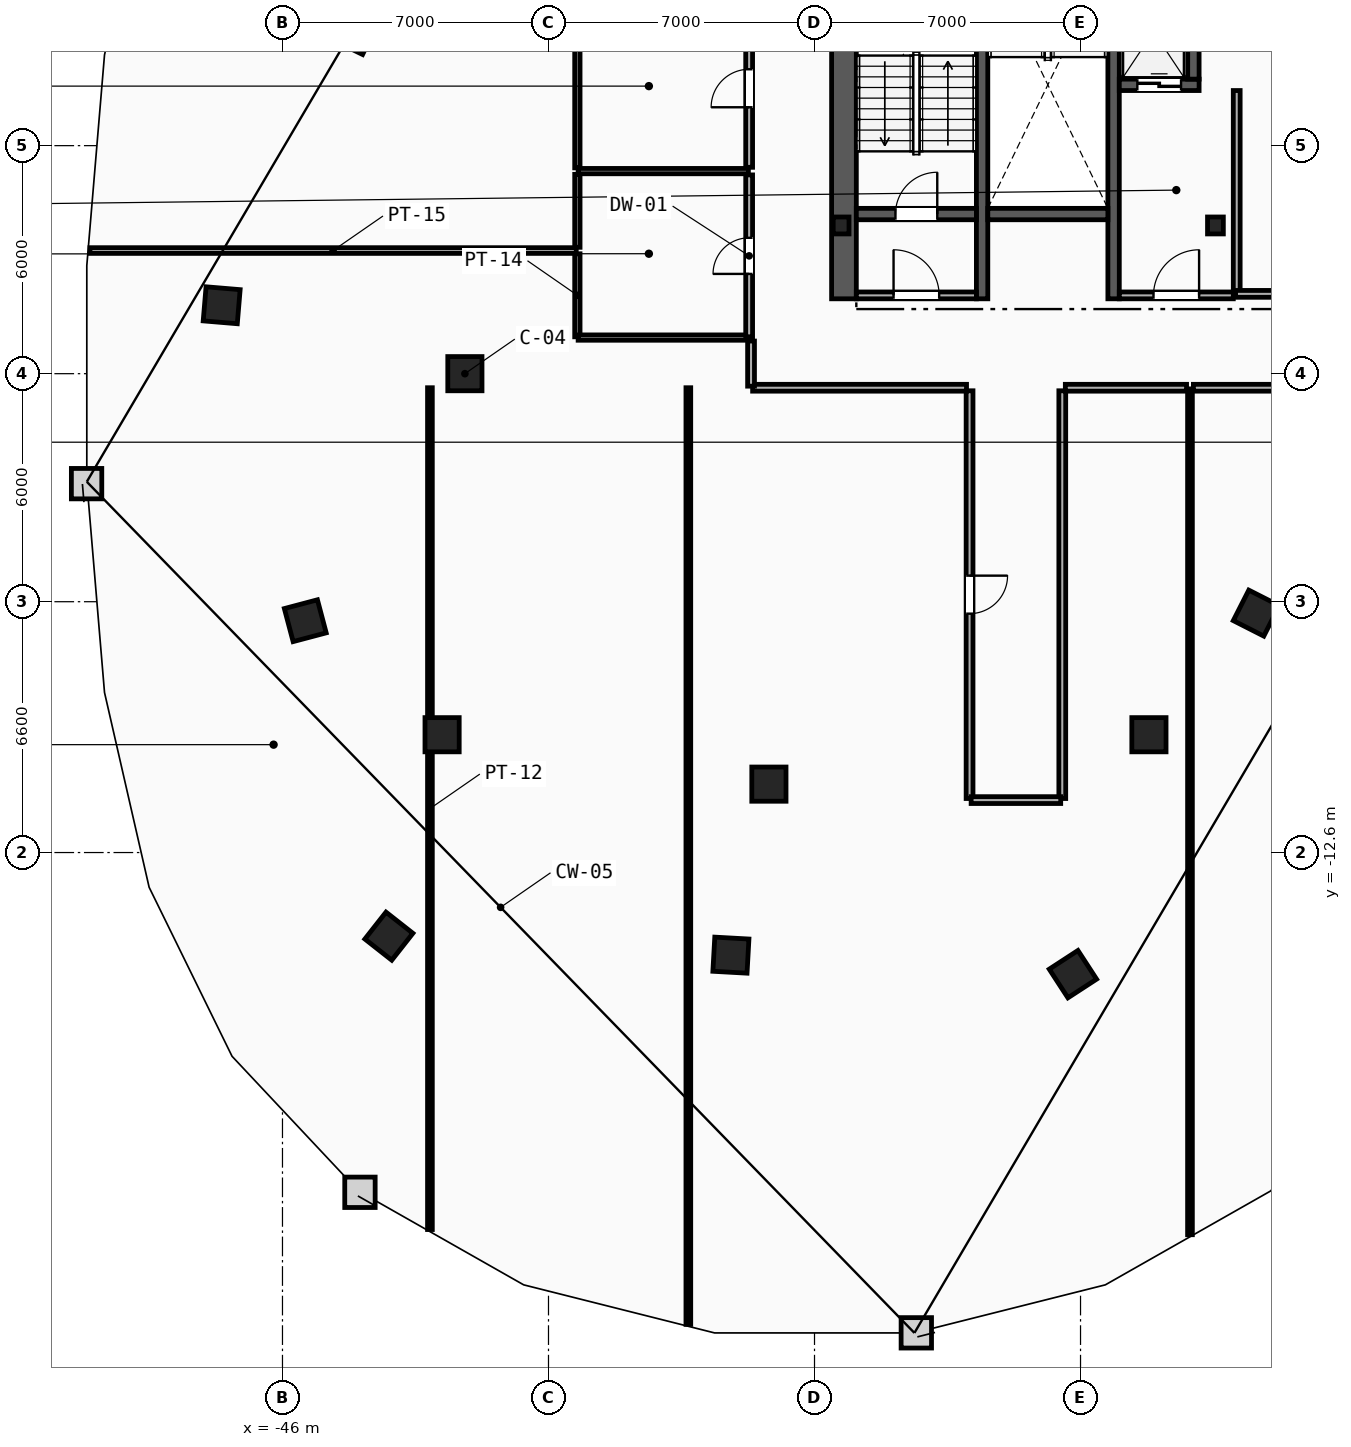
"""IFC4 building model, lengths in metres.
Left out: names, types, materials, properties, quantities, classifications, styles, units other than length and angle.
Written with IfcOpenShell. Run it as: python <this file> out.ifc"""

import sys

from ifc_helpers import new_model, si_unit, direction, frame, frame_2d, origin, origin_2d, place, context, subcontext, project, spatial, rectangle, i_section, extrude, element, fill, save


model = new_model("IFC4")
c1 = context("Model", 3, precision=1e-05, world=origin(), true_north=direction((0.0, 1.0)))
c2 = subcontext(c1, "Body", "Model", "MODEL_VIEW")
j1 = project(units=[si_unit("LENGTHUNIT", "METRE"), si_unit("PLANEANGLEUNIT", "RADIAN")], contexts=[c1])
p1 = place(None, origin())
s1 = spatial("IfcSite", under=j1, at=p1, CompositionType="ELEMENT")
p2 = place(p1, origin())
s2 = spatial("IfcBuilding", under=s1, at=p2, CompositionType="ELEMENT")
p3 = place(p2, frame((0.0, 0.0, 195.4)))
s3 = spatial("IfcBuildingStorey", under=s2, at=p3, CompositionType="ELEMENT", Elevation=195.4)
for number, where, z_axis, x_axis in (
    (1, (-31.3, 3.9, 0.0), (0.0, 0.0, 1.0), (1.0, 0.0, 0.0)),
    (2, (-21.45, 3.9, 0.0), (0.0, 0.0, 1.0), (1.0, 0.0, 0.0)),
):
    element("IfcColumn", number, at=place(p3, frame(where, z_axis=z_axis, x_axis=x_axis)), inside=s3, PredefinedType="COLUMN", context=c2, shape_type="SweptSolid", body=[
        extrude(i_section(OverallWidth=0.416, OverallDepth=0.446, WebThickness=0.039, FlangeThickness=0.063, FilletRadius=0.018, at=origin_2d()), origin(), (0.0, 0.0, 1.0), 3.6),
    ])
for number, where, z_axis, x_axis in (
    (3, (-41.2, 0.0, 0.0), (0.0, 0.0, 1.0), (1.0, 0.0, 0.0)),
    (4, (-41.8, -9.5, 0.0), (0.0, 0.0, 1.0), (1.0, 0.0, 0.0)),
    (5, (-33.2, -10.8, 0.0), (0.0, 0.0, 1.0), (1.0, 0.0, 0.0)),
    (6, (-23.2, -9.5, 0.0), (0.0, 0.0, 1.0), (1.0, 0.0, 0.0)),
    (7, (-44.1, 9.0, 0.0), (0.0, 0.0, 1.0), (-0.437, -0.899, 0.0)),
    (8, (-47.6, 1.8, 0.0), (0.0, 0.0, 1.0), (-0.084, -0.997, 0.0)),
    (9, (-45.4, -6.5, 0.0), (0.0, 0.0, 1.0), (0.256, -0.967, 0.0)),
    (10, (-43.2, -14.8, 0.0), (0.0, 0.0, 1.0), (0.786, -0.618, 0.0)),
    (11, (-34.2, -15.3, 0.0), (0.0, 0.0, 1.0), (0.998, -0.055, 0.0)),
    (12, (-25.2, -15.8, 0.0), (0.0, 0.0, 1.0), (0.838, 0.546, 0.0)),
    (13, (-20.375, -6.3, 0.0), (0.0, 0.0, 1.0), (0.453, 0.892, 0.0)),
):
    element("IfcColumn", number, at=place(p3, frame(where, z_axis=z_axis, x_axis=x_axis)), inside=s3, PredefinedType="COLUMN", context=c2, shape_type="SweptSolid", body=[
        extrude(rectangle(XDim=0.9, YDim=0.9, at=origin_2d()), origin(), (0.0, 0.0, 1.0), 3.6),
    ])
p4 = place(p3, frame((-31.225, 1.97, 0.0), z_axis=(0.0, 0.0, 1.0), x_axis=(0.0, 1.0, 0.0)))
e14 = element("IfcWall", 14, at=p4, inside=s3, PredefinedType="SHEAR", context=c2, shape_type="SweptSolid", body=[
    extrude(rectangle(XDim=13.33, YDim=0.65, at=frame_2d((6.665, 0.0))), origin(), (0.0, 0.0, 1.0), 3.34),
])
for number, where, z_axis, x_axis in (
    (15, (-27.59, 1.97, 0.0), (0.0, 0.0, 1.0), (0.0, 1.0, 0.0)),
    (16, (-24.13, 1.97, 0.0), (0.0, 0.0, 1.0), (0.0, 1.0, 0.0)),
):
    element("IfcWall", number, at=place(p3, frame(where, z_axis=z_axis, x_axis=x_axis)), inside=s3, PredefinedType="SHEAR", context=c2, shape_type="SweptSolid", body=[
        extrude(rectangle(XDim=10.68, YDim=0.3, at=frame_2d((5.34, 0.0))), origin(), (0.0, 0.0, 1.0), 3.34),
    ])
p5 = place(p3, frame((-30.9, 4.2, 0.0), z_axis=(0.0, 0.0, 1.0), x_axis=(1.0, 0.0, 0.0)))
e17 = element("IfcWall", 17, at=p5, inside=s3, PredefinedType="SHEAR", context=c2, shape_type="SweptSolid", body=[
    extrude(rectangle(XDim=3.16, YDim=0.3, at=frame_2d((1.58, 0.0))), origin(), (0.0, 0.0, 1.0), 3.34),
])
p6 = place(p5, frame((1.03, 0.0, 0.0)))
e18 = element("IfcOpeningElement", 18, at=p6, cuts=e17, PredefinedType="OPENING", context=c2, shape_type="SweptSolid", body=[
    extrude(rectangle(XDim=1.1, YDim=2.15, at=frame_2d((0.55, 1.075))), frame((0.0, 0.16, 0.0), z_axis=(0.0, -1.0, 0.0), x_axis=(1.0, 0.0, 0.0)), (0.0, 0.0, 1.0), 0.32),
])
p7 = place(p3, frame((-27.44, 4.2, 0.0), z_axis=(0.0, 0.0, 1.0), x_axis=(1.0, 0.0, 0.0)))
e19 = element("IfcWall", 19, at=p7, inside=s3, PredefinedType="SHEAR", context=c2, shape_type="SweptSolid", body=[
    extrude(rectangle(XDim=3.16, YDim=0.3, at=frame_2d((1.58, 0.0))), origin(), (0.0, 0.0, 1.0), 3.34),
])
p8 = place(p3, frame((-20.89, 2.15, 0.0), z_axis=(0.0, 0.0, 1.0), x_axis=(0.0, 1.0, 0.0)))
e20 = element("IfcWall", 20, at=p8, inside=s3, PredefinedType="PARTITIONING", context=c2, shape_type="SweptSolid", body=[
    extrude(rectangle(XDim=5.3, YDim=0.18, at=frame_2d((2.65, 0.0))), origin(), (0.0, 0.0, 1.0), 3.34),
])
p9 = place(p3, frame((-23.98, 2.06, 0.0), z_axis=(0.0, 0.0, 1.0), x_axis=(1.0, 0.0, 0.0)))
e21 = element("IfcWall", 21, at=p9, inside=s3, PredefinedType="PARTITIONING", context=c2, shape_type="SweptSolid", body=[
    extrude(rectangle(XDim=3.0, YDim=0.18, at=frame_2d((1.5, 0.0))), origin(), (0.0, 0.0, 1.0), 3.34),
])
p10 = place(p9, frame((0.9, 0.0, 0.0)))
e22 = element("IfcOpeningElement", 22, at=p10, cuts=e21, PredefinedType="OPENING", context=c2, shape_type="SweptSolid", body=[
    extrude(rectangle(XDim=1.2, YDim=2.15, at=frame_2d((0.6, 1.075))), frame((0.0, 0.1, 0.0), z_axis=(0.0, -1.0, 0.0), x_axis=(1.0, 0.0, 0.0)), (0.0, 0.0, 1.0), 0.2),
])
p11 = place(p3, frame((-30.9, 2.06, 0.0), z_axis=(0.0, 0.0, 1.0), x_axis=(1.0, 0.0, 0.0)))
e23 = element("IfcWall", 23, at=p11, inside=s3, PredefinedType="PARTITIONING", context=c2, shape_type="SweptSolid", body=[
    extrude(rectangle(XDim=3.16, YDim=0.18, at=frame_2d((1.58, 0.0))), origin(), (0.0, 0.0, 1.0), 3.34),
])
p12 = place(p11, frame((0.98, 0.0, 0.0)))
e24 = element("IfcOpeningElement", 24, at=p12, cuts=e23, PredefinedType="OPENING", context=c2, shape_type="SweptSolid", body=[
    extrude(rectangle(XDim=1.2, YDim=2.15, at=frame_2d((0.6, 1.075))), frame((0.0, 0.1, 0.0), z_axis=(0.0, -1.0, 0.0), x_axis=(1.0, 0.0, 0.0)), (0.0, 0.0, 1.0), 0.2),
])
p13 = place(p3, frame((-23.98, 7.6, 0.0), z_axis=(0.0, 0.0, 1.0), x_axis=(1.0, 0.0, 0.0)))
e25 = element("IfcWall", 25, at=p13, inside=s3, PredefinedType="SHEAR", context=c2, shape_type="SweptSolid", body=[
    extrude(rectangle(XDim=2.1, YDim=0.3, at=frame_2d((1.05, 0.0))), origin(), (0.0, 0.0, 1.0), 3.34),
])
p14 = place(p13, frame((0.475, 0.0, 0.0)))
e26 = element("IfcOpeningElement", 26, at=p14, cuts=e25, PredefinedType="OPENING", context=c2, shape_type="SweptSolid", body=[
    extrude(rectangle(XDim=1.15, YDim=2.2, at=frame_2d((0.575, 1.1))), frame((0.0, 0.16, 0.0), z_axis=(0.0, -1.0, 0.0), x_axis=(1.0, 0.0, 0.0)), (0.0, 0.0, 1.0), 0.32),
])
p15 = place(p3, frame((-22.03, 7.75, 0.0), z_axis=(0.0, 0.0, 1.0), x_axis=(0.0, 1.0, 0.0)))
e27 = element("IfcWall", 27, at=p15, inside=s3, PredefinedType="SHEAR", context=c2, shape_type="SweptSolid", body=[
    extrude(rectangle(XDim=2.5, YDim=0.3, at=frame_2d((1.25, 0.0))), origin(), (0.0, 0.0, 1.0), 3.34),
])
p16 = place(p3, frame((-38.24, 0.97, 0.0), z_axis=(0.0, 0.0, 1.0), x_axis=(0.0, 1.0, 0.0)))
e28 = element("IfcWall", 28, at=p16, inside=s3, PredefinedType="PARTITIONING", context=c2, shape_type="SweptSolid", body=[
    extrude(rectangle(XDim=2.185, YDim=0.14, at=frame_2d((1.093, 0.0))), origin(), (0.0, 0.0, 1.0), 3.34),
])
p17 = place(p3, frame((-38.24, 3.325, 0.0), z_axis=(0.0, 0.0, 1.0), x_axis=(0.0, 1.0, 0.0)))
e29 = element("IfcWall", 29, at=p17, inside=s3, PredefinedType="PARTITIONING", context=c2, shape_type="SweptSolid", body=[
    extrude(rectangle(XDim=1.92, YDim=0.14, at=frame_2d((0.96, 0.0))), origin(), (0.0, 0.0, 1.0), 3.34),
])
p18 = place(p3, frame((-38.24, 5.415, 0.0), z_axis=(0.0, 0.0, 1.0), x_axis=(0.0, 1.0, 0.0)))
e30 = element("IfcWall", 30, at=p18, inside=s3, PredefinedType="PARTITIONING", context=c2, shape_type="SweptSolid", body=[
    extrude(rectangle(XDim=4.175, YDim=0.14, at=frame_2d((2.087, 0.0))), origin(), (0.0, 0.0, 1.0), 3.34),
])
for number, where, z_axis, x_axis in (
    (31, (-38.22, 0.95, 0.0), (0.0, 0.0, 1.0), (1.0, 0.0, 0.0)),
    (32, (-38.22, 5.33, 0.0), (0.0, 0.0, 1.0), (1.0, 0.0, 0.0)),
):
    element("IfcWall", number, at=place(p3, frame(where, z_axis=z_axis, x_axis=x_axis)), inside=s3, PredefinedType="PARTITIONING", context=c2, shape_type="SweptSolid", body=[
        extrude(rectangle(XDim=4.48, YDim=0.14, at=frame_2d((2.24, 0.0))), origin(), (0.0, 0.0, 1.0), 3.34),
    ])
p19 = place(p3, frame((-33.72, 0.97, 0.0), z_axis=(0.0, 0.0, 1.0), x_axis=(0.0, 1.0, 0.0)))
e33 = element("IfcWall", 33, at=p19, inside=s3, PredefinedType="PARTITIONING", context=c2, shape_type="SweptSolid", body=[
    extrude(rectangle(XDim=4.26, YDim=0.18, at=frame_2d((2.13, 0.0))), origin(), (0.0, 0.0, 1.0), 3.34),
])
p20 = place(p19, frame((1.655, 0.0, 0.0)))
e34 = element("IfcOpeningElement", 34, at=p20, cuts=e33, PredefinedType="OPENING", context=c2, shape_type="SweptSolid", body=[
    extrude(rectangle(XDim=0.95, YDim=2.1, at=frame_2d((0.475, 1.05))), frame((0.0, 0.1, 0.0), z_axis=(0.0, -1.0, 0.0), x_axis=(1.0, 0.0, 0.0)), (0.0, 0.0, 1.0), 0.2),
])
p21 = place(p3, frame((-33.72, 5.43, 0.0), z_axis=(0.0, 0.0, 1.0), x_axis=(0.0, 1.0, 0.0)))
e35 = element("IfcWall", 35, at=p21, inside=s3, PredefinedType="PARTITIONING", context=c2, shape_type="SweptSolid", body=[
    extrude(rectangle(XDim=4.16, YDim=0.18, at=frame_2d((2.08, 0.0))), origin(), (0.0, 0.0, 1.0), 3.34),
])
p22 = place(p21, frame((1.58, 0.0, 0.0)))
e36 = element("IfcOpeningElement", 36, at=p22, cuts=e35, PredefinedType="OPENING", context=c2, shape_type="SweptSolid", body=[
    extrude(rectangle(XDim=1.0, YDim=2.15, at=frame_2d((0.5, 1.075))), frame((0.0, 0.1, 0.0), z_axis=(0.0, -1.0, 0.0), x_axis=(1.0, 0.0, 0.0)), (0.0, 0.0, 1.0), 0.2),
])
p23 = place(p3, frame((-42.12, -22.52, 0.0), z_axis=(0.0, 0.0, 1.0), x_axis=(0.0, 1.0, 0.0)))
e37 = element("IfcWall", 37, at=p23, inside=s3, PredefinedType="PARTITIONING", context=c2, shape_type="SweptSolid", body=[
    extrude(rectangle(XDim=22.149, YDim=0.125, at=frame_2d((11.075, 0.0))), origin(), (0.0, 0.0, 1.0), 3.34),
])
p24 = place(p3, frame((-35.32, -25.015, 0.0), z_axis=(0.0, 0.0, 1.0), x_axis=(0.0, 1.0, 0.0)))
e38 = element("IfcWall", 38, at=p24, inside=s3, PredefinedType="PARTITIONING", context=c2, shape_type="SweptSolid", body=[
    extrude(rectangle(XDim=24.645, YDim=0.125, at=frame_2d((12.323, 0.0))), origin(), (0.0, 0.0, 1.0), 3.34),
])
p25 = place(p3, frame((-22.12, -22.656, 0.0), z_axis=(0.0, 0.0, 1.0), x_axis=(0.0, 1.0, 0.0)))
e39 = element("IfcWall", 39, at=p25, inside=s3, PredefinedType="PARTITIONING", context=c2, shape_type="SweptSolid", body=[
    extrude(rectangle(XDim=22.256, YDim=0.125, at=frame_2d((11.128, 0.0))), origin(), (0.0, 0.0, 1.0), 2.724),
])
p26 = place(p3, frame((-51.066, 3.24, 0.0), z_axis=(0.0, 0.0, 1.0), x_axis=(1.0, 0.0, 0.0)))
e40 = element("IfcWall", 40, at=p26, inside=s3, PredefinedType="PARTITIONING", context=c2, shape_type="SweptSolid", body=[
    extrude(rectangle(XDim=12.796, YDim=0.15, at=frame_2d((6.398, 0.0))), origin(), (0.0, 0.0, 1.0), 3.34),
])
p27 = place(p3, frame((-27.92, -0.45, 0.0), z_axis=(0.0, 0.0, 1.0), x_axis=(0.0, -1.0, 0.0)))
e41 = element("IfcWall", 41, at=p27, inside=s3, PredefinedType="PARTITIONING", context=c2, shape_type="SweptSolid", body=[
    extrude(rectangle(XDim=10.729, YDim=0.18, at=frame_2d((5.364, 0.0))), origin(), (0.0, 0.0, 1.0), 3.34),
])
p28 = place(p27, frame((4.864, 0.0, 0.0)))
e42 = element("IfcOpeningElement", 42, at=p28, cuts=e41, PredefinedType="OPENING", context=c2, shape_type="SweptSolid", body=[
    extrude(rectangle(XDim=1.0, YDim=2.15, at=frame_2d((0.5, 1.075))), frame((0.0, 0.1, 0.0), z_axis=(0.0, -1.0, 0.0), x_axis=(1.0, 0.0, 0.0)), (0.0, 0.0, 1.0), 0.2),
])
p29 = place(p3, frame((-25.48, -11.178, 0.0), z_axis=(0.0, 0.0, 1.0), x_axis=(0.0, 1.0, 0.0)))
e43 = element("IfcWall", 43, at=p29, inside=s3, PredefinedType="PARTITIONING", context=c2, shape_type="SweptSolid", body=[
    extrude(rectangle(XDim=10.729, YDim=0.18, at=frame_2d((5.364, 0.0))), origin(), (0.0, 0.0, 1.0), 3.34),
])
p30 = place(p3, frame((-33.628, -0.37, 0.0), z_axis=(0.0, 0.0, 1.0), x_axis=(1.0, 0.0, 0.0)))
e44 = element("IfcWall", 44, at=p30, inside=s3, PredefinedType="PARTITIONING", context=c2, shape_type="SweptSolid", body=[
    extrude(rectangle(XDim=5.628, YDim=0.18, at=frame_2d((2.814, 0.0))), origin(), (0.0, 0.0, 1.0), 3.34),
])
p31 = place(p3, frame((-25.4, -0.37, 0.0), z_axis=(0.0, 0.0, 1.0), x_axis=(1.0, 0.0, 0.0)))
e45 = element("IfcWall", 45, at=p31, inside=s3, PredefinedType="PARTITIONING", context=c2, shape_type="SweptSolid", body=[
    extrude(rectangle(XDim=3.19, YDim=0.18, at=frame_2d((1.595, 0.0))), origin(), (0.0, 0.0, 1.0), 3.34),
])
p32 = place(p3, frame((-27.878, -11.22, 0.0), z_axis=(0.0, 0.0, 1.0), x_axis=(1.0, 0.0, 0.0)))
e46 = element("IfcWall", 46, at=p32, inside=s3, PredefinedType="PARTITIONING", context=c2, shape_type="SweptSolid", body=[
    extrude(rectangle(XDim=2.357, YDim=0.18, at=frame_2d((1.178, 0.0))), origin(), (0.0, 0.0, 1.0), 3.34),
])
p33 = place(p3, frame((-33.67, 0.859, 0.0), z_axis=(0.0, 0.0, 1.0), x_axis=(0.0, -1.0, 0.0)))
e47 = element("IfcWall", 47, at=p33, inside=s3, PredefinedType="PARTITIONING", context=c2, shape_type="SweptSolid", body=[
    extrude(rectangle(XDim=1.187, YDim=0.18, at=frame_2d((0.594, 0.0))), origin(), (0.0, 0.0, 1.0), 3.34),
])
p34 = place(p3, frame((-22.03, -0.37, 0.0), z_axis=(0.0, 0.0, 1.0), x_axis=(1.0, 0.0, 0.0)))
e48 = element("IfcWall", 48, at=p34, inside=s3, PredefinedType="PARTITIONING", context=c2, shape_type="SweptSolid", body=[
    extrude(rectangle(XDim=5.208, YDim=0.18, at=frame_2d((2.604, 0.0))), origin(), (0.0, 0.0, 1.0), 3.34),
])
p35 = place(p3, frame((-16.822, 2.1, 0.0), z_axis=(0.0, 0.0, 1.0), x_axis=(-1.0, 0.0, 0.0)))
e49 = element("IfcWall", 49, at=p35, inside=s3, PredefinedType="PARTITIONING", context=c2, shape_type="SweptSolid", body=[
    extrude(rectangle(XDim=4.098, YDim=0.18, at=frame_2d((2.049, 0.0))), origin(), (0.0, 0.0, 1.0), 3.34),
])
p36 = place(p6, origin())
e50 = element("IfcDoor", 50, at=p36, inside=s3, OperationType="SINGLE_SWING_RIGHT", PredefinedType="DOOR", context=c2, shape_type="SweptSolid", body=[
    extrude(rectangle(XDim=1.1, YDim=2.15, at=frame_2d((0.55, 1.075))), frame((0.0, 0.025, 0.0), z_axis=(0.0, -1.0, 0.0), x_axis=(1.0, 0.0, 0.0)), (0.0, 0.0, 1.0), 0.05),
])
fill(e18, e50)
p37 = place(p10, origin())
e51 = element("IfcDoor", 51, at=p37, inside=s3, OperationType="SINGLE_SWING_RIGHT", PredefinedType="DOOR", context=c2, shape_type="SweptSolid", body=[
    extrude(rectangle(XDim=1.2, YDim=2.15, at=frame_2d((0.6, 1.075))), frame((0.0, 0.025, 0.0), z_axis=(0.0, -1.0, 0.0), x_axis=(1.0, 0.0, 0.0)), (0.0, 0.0, 1.0), 0.05),
])
fill(e22, e51)
p38 = place(p12, origin())
e52 = element("IfcDoor", 52, at=p38, inside=s3, OperationType="SINGLE_SWING_LEFT", PredefinedType="DOOR", context=c2, shape_type="SweptSolid", body=[
    extrude(rectangle(XDim=1.2, YDim=2.15, at=frame_2d((0.6, 1.075))), frame((0.0, 0.025, 0.0), z_axis=(0.0, -1.0, 0.0), x_axis=(1.0, 0.0, 0.0)), (0.0, 0.0, 1.0), 0.05),
])
fill(e24, e52)
p39 = place(p14, origin())
e53 = element("IfcDoor", 53, at=p39, inside=s3, OperationType="SLIDING_TO_LEFT", PredefinedType="TRAPDOOR", context=c2, shape_type="SweptSolid", body=[
    extrude(rectangle(XDim=1.15, YDim=2.2, at=frame_2d((0.575, 1.1))), frame((0.0, 0.025, 0.0), z_axis=(0.0, -1.0, 0.0), x_axis=(1.0, 0.0, 0.0)), (0.0, 0.0, 1.0), 0.05),
])
fill(e26, e53)
p40 = place(p28, origin())
e54 = element("IfcDoor", 54, at=p40, inside=s3, OperationType="SINGLE_SWING_LEFT", PredefinedType="DOOR", context=c2, shape_type="SweptSolid", body=[
    extrude(rectangle(XDim=1.0, YDim=2.15, at=frame_2d((0.5, 1.075))), frame((0.0, 0.025, 0.0), z_axis=(0.0, -1.0, 0.0), x_axis=(1.0, 0.0, 0.0)), (0.0, 0.0, 1.0), 0.05),
])
fill(e42, e54)
p41 = place(p20, origin())
e55 = element("IfcDoor", 55, at=p41, inside=s3, OperationType="SINGLE_SWING_LEFT", PredefinedType="DOOR", context=c2, shape_type="SweptSolid", body=[
    extrude(rectangle(XDim=0.95, YDim=2.1, at=frame_2d((0.475, 1.05))), frame((0.0, 0.025, 0.0), z_axis=(0.0, -1.0, 0.0), x_axis=(1.0, 0.0, 0.0)), (0.0, 0.0, 1.0), 0.05),
])
fill(e34, e55)
p42 = place(p22, origin())
e56 = element("IfcDoor", 56, at=p42, inside=s3, OperationType="SINGLE_SWING_LEFT", PredefinedType="DOOR", context=c2, shape_type="SweptSolid", body=[
    extrude(rectangle(XDim=1.0, YDim=2.15, at=frame_2d((0.5, 1.075))), frame((0.0, 0.025, 0.0), z_axis=(0.0, -1.0, 0.0), x_axis=(1.0, 0.0, 0.0)), (0.0, 0.0, 1.0), 0.05),
])
fill(e36, e56)
save(model, sys.argv[1])
